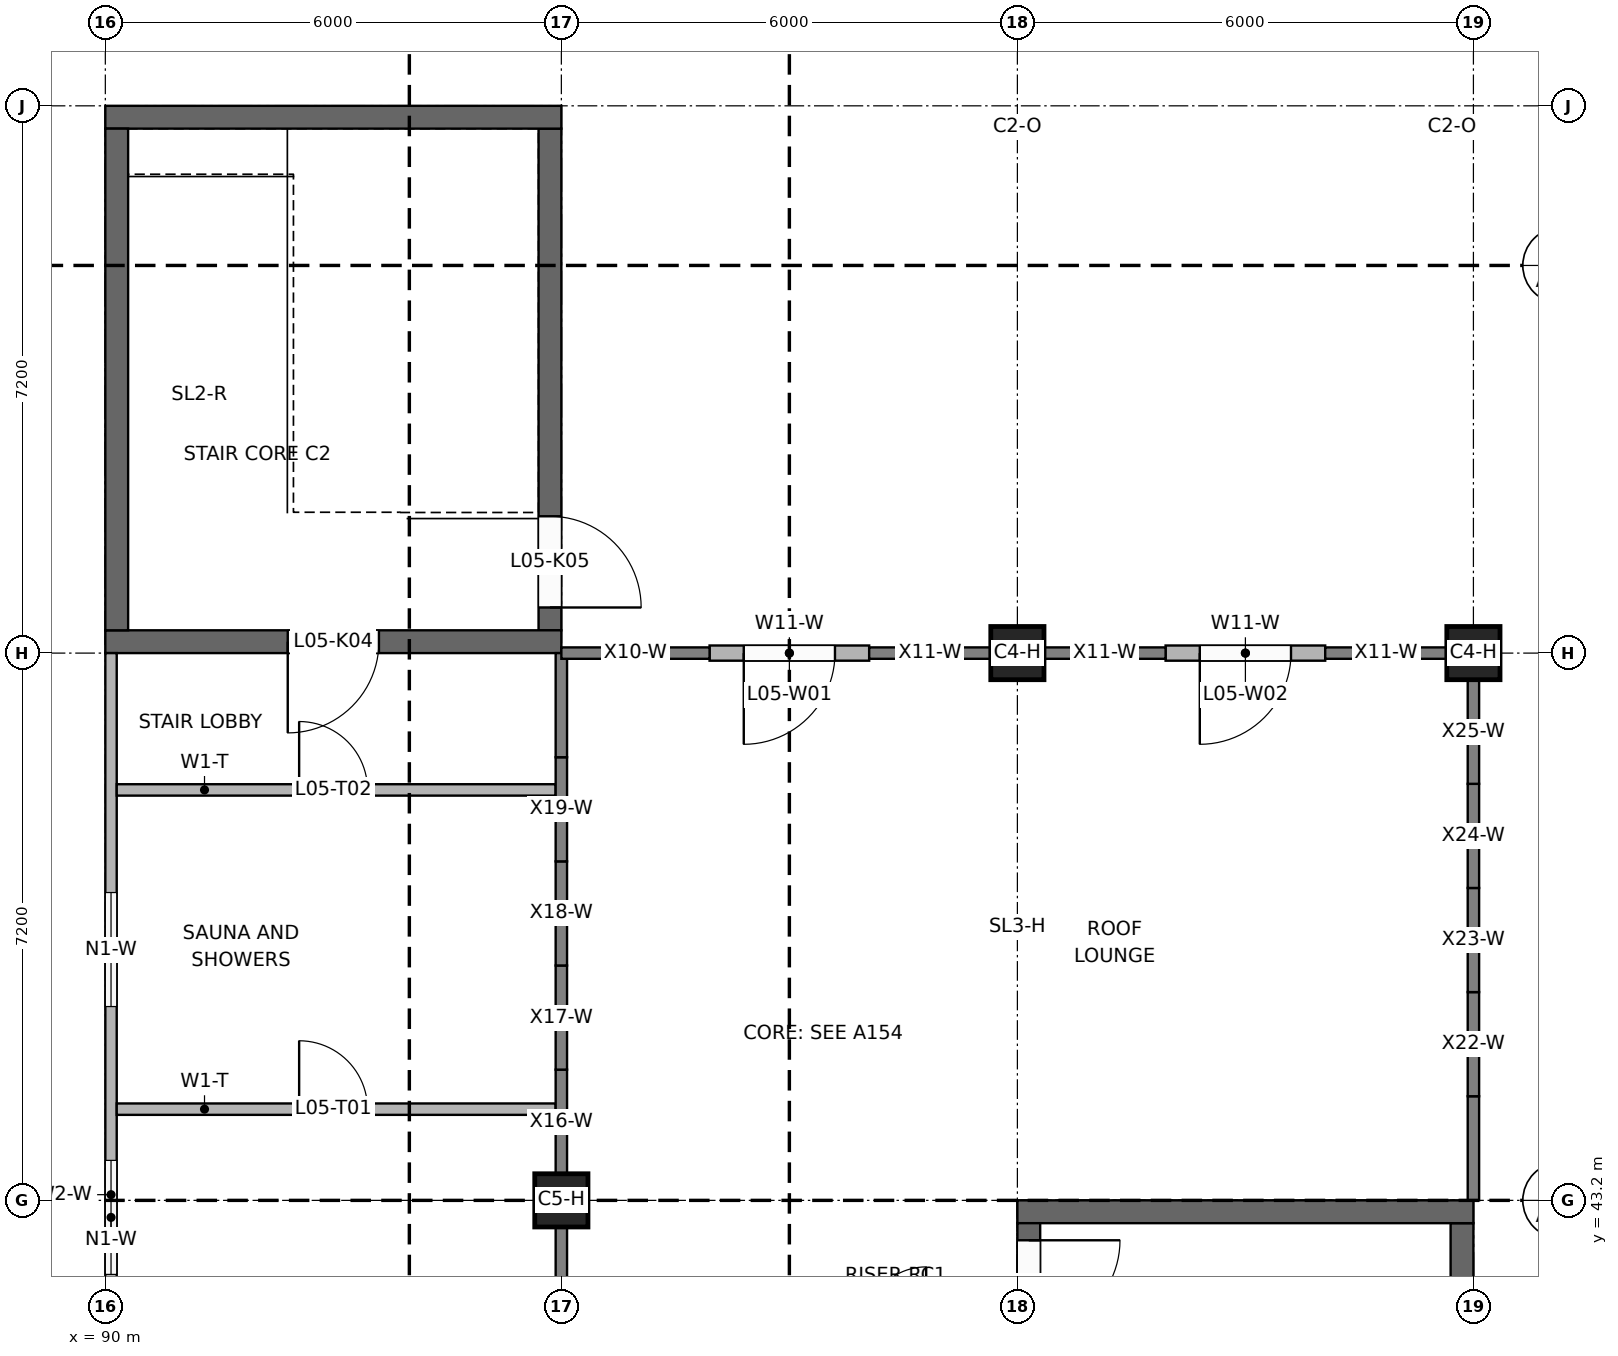
"""IFC4 building model, lengths in metres.
Left out: names, types, materials, properties, quantities, classifications, styles, units other than length and angle.
Written with IfcOpenShell. Run it as: python <this file> out.ifc"""

import sys

from ifc_helpers import new_model, si_unit, direction, frame, frame_2d, origin, origin_2d, place, context, subcontext, project, spatial, rectangle, hollow_rectangle, extrude, element, fill, save


model = new_model("IFC4")
c1 = context("Model", 3, precision=1e-05, world=origin(), true_north=direction((0.0, 1.0)))
c2 = subcontext(c1, "Body", "Model", "MODEL_VIEW")
j1 = project(units=[si_unit("LENGTHUNIT", "METRE"), si_unit("PLANEANGLEUNIT", "RADIAN")], contexts=[c1])
p1 = place(None, origin())
s1 = spatial("IfcSite", under=j1, at=p1, CompositionType="ELEMENT")
p2 = place(p1, origin())
s2 = spatial("IfcBuilding", under=s1, at=p2, CompositionType="ELEMENT")
p3 = place(p2, frame((0.0, 0.0, 21.0)))
s3 = spatial("IfcBuildingStorey", under=s2, at=p3, CompositionType="ELEMENT", Elevation=21.0)
p4 = place(p3, frame((102.0, 43.05, 0.0), z_axis=(0.0, 0.0, 1.0), x_axis=(1.0, 0.0, 0.0)))
e1 = element("IfcWall", 1, at=p4, inside=s3, PredefinedType="SHEAR", context=c2, shape_type="SweptSolid", body=[
    extrude(rectangle(XDim=6.0, YDim=0.3, at=frame_2d((3.0, 0.0))), origin(), (0.0, 0.0, 1.0), 2.75),
])
p5 = place(p3, frame((102.15, 36.3, 0.0), z_axis=(0.0, 0.0, 1.0), x_axis=(0.0, 1.0, 0.0)))
e2 = element("IfcWall", 2, at=p5, inside=s3, PredefinedType="SHEAR", context=c2, shape_type="SweptSolid", body=[
    extrude(rectangle(XDim=6.6, YDim=0.3, at=frame_2d((3.3, 0.0))), origin(), (0.0, 0.0, 1.0), 2.75),
])
p6 = place(p5, frame((5.175, 0.0, 0.0)))
e3 = element("IfcOpeningElement", 3, at=p6, cuts=e2, PredefinedType="OPENING", context=c2, shape_type="SweptSolid", body=[
    extrude(rectangle(XDim=1.2, YDim=2.1, at=frame_2d((0.6, 1.05))), frame((0.0, 0.16, 0.0), z_axis=(0.0, -1.0, 0.0), x_axis=(1.0, 0.0, 0.0)), (0.0, 0.0, 1.0), 0.32),
])
p7 = place(p3, frame((107.85, 36.3, 0.0), z_axis=(0.0, 0.0, 1.0), x_axis=(0.0, 1.0, 0.0)))
e4 = element("IfcWall", 4, at=p7, inside=s3, PredefinedType="SHEAR", context=c2, shape_type="SweptSolid", body=[
    extrude(rectangle(XDim=6.6, YDim=0.3, at=frame_2d((3.3, 0.0))), origin(), (0.0, 0.0, 1.0), 2.75),
])
p8 = place(p3, frame((90.0, 50.55, 0.0), z_axis=(0.0, 0.0, 1.0), x_axis=(1.0, 0.0, 0.0)))
e5 = element("IfcWall", 5, at=p8, inside=s3, PredefinedType="SHEAR", context=c2, shape_type="SweptSolid", body=[
    extrude(rectangle(XDim=6.0, YDim=0.3, at=frame_2d((3.0, 0.0))), origin(), (0.0, 0.0, 1.0), 2.4),
])
p9 = place(p8, frame((2.4, 0.0, 0.0)))
e6 = element("IfcOpeningElement", 6, at=p9, cuts=e5, PredefinedType="OPENING", context=c2, shape_type="SweptSolid", body=[
    extrude(rectangle(XDim=1.2, YDim=2.1, at=frame_2d((0.6, 1.05))), frame((0.0, 0.16, 0.0), z_axis=(0.0, -1.0, 0.0), x_axis=(1.0, 0.0, 0.0)), (0.0, 0.0, 1.0), 0.32),
])
p10 = place(p3, frame((90.0, 57.45, 0.0), z_axis=(0.0, 0.0, 1.0), x_axis=(1.0, 0.0, 0.0)))
e7 = element("IfcWall", 7, at=p10, inside=s3, PredefinedType="SHEAR", context=c2, shape_type="SweptSolid", body=[
    extrude(rectangle(XDim=6.0, YDim=0.3, at=frame_2d((3.0, 0.0))), origin(), (0.0, 0.0, 1.0), 2.4),
])
p11 = place(p3, frame((90.15, 50.7, 0.0), z_axis=(0.0, 0.0, 1.0), x_axis=(0.0, 1.0, 0.0)))
e8 = element("IfcWall", 8, at=p11, inside=s3, PredefinedType="SHEAR", context=c2, shape_type="SweptSolid", body=[
    extrude(rectangle(XDim=6.6, YDim=0.3, at=frame_2d((3.3, 0.0))), origin(), (0.0, 0.0, 1.0), 2.4),
])
p12 = place(p3, frame((95.85, 50.7, 0.0), z_axis=(0.0, 0.0, 1.0), x_axis=(0.0, 1.0, 0.0)))
e9 = element("IfcWall", 9, at=p12, inside=s3, PredefinedType="SHEAR", context=c2, shape_type="SweptSolid", body=[
    extrude(rectangle(XDim=6.6, YDim=0.3, at=frame_2d((3.3, 0.0))), origin(), (0.0, 0.0, 1.0), 2.4),
])
p13 = place(p12, frame((0.3, 0.0, 0.0)))
e10 = element("IfcOpeningElement", 10, at=p13, cuts=e9, PredefinedType="OPENING", context=c2, shape_type="SweptSolid", body=[
    extrude(rectangle(XDim=1.2, YDim=2.1, at=frame_2d((0.6, 1.05))), frame((0.0, 0.16, 0.0), z_axis=(0.0, -1.0, 0.0), x_axis=(1.0, 0.0, 0.0)), (0.0, 0.0, 1.0), 0.32),
])
p14 = place(p3, frame((96.0, 43.2, 0.0), z_axis=(0.0, 0.0, 1.0), x_axis=(1.0, 0.0, 0.0)))
e11 = element("IfcColumn", 11, at=p14, inside=s3, PredefinedType="COLUMN", context=c2, shape_type="SweptSolid", body=[
    extrude(rectangle(XDim=0.7, YDim=0.7, at=origin_2d()), origin(), (0.0, 0.0, 1.0), 2.247),
])
for number, where, z_axis, x_axis in (
    (12, (102.0, 50.4, 0.0), (0.0, 0.0, 1.0), (1.0, 0.0, 0.0)),
    (13, (108.0, 50.4, 0.0), (0.0, 0.0, 1.0), (1.0, 0.0, 0.0)),
):
    element("IfcColumn", number, at=place(p3, frame(where, z_axis=z_axis, x_axis=x_axis)), inside=s3, PredefinedType="COLUMN", context=c2, shape_type="SweptSolid", body=[
        extrude(rectangle(XDim=0.7, YDim=0.7, at=origin_2d()), origin(), (0.0, 0.0, 1.0), 3.714),
    ])
p15 = place(p3, frame((107.91, 50.42, 0.0), z_axis=(0.0, 0.0, 1.0), x_axis=(0.0, 1.0, 0.0)))
e14 = element("IfcWall", 14, at=p15, inside=s3, PredefinedType="PARAPET", context=c2, shape_type="SweptSolid", body=[
    extrude(rectangle(XDim=7.18, YDim=0.18, at=frame_2d((3.59, 0.0))), origin(), (0.0, 0.0, 1.0), 1.1),
])
p16 = place(p3, frame((96.0, 57.51, 0.0), z_axis=(0.0, 0.0, 1.0), x_axis=(1.0, 0.0, 0.0)))
e15 = element("IfcWall", 15, at=p16, inside=s3, PredefinedType="PARAPET", context=c2, shape_type="SweptSolid", body=[
    extrude(rectangle(XDim=12.0, YDim=0.18, at=frame_2d((6.0, 0.0))), origin(), (0.0, 0.0, 1.0), 1.1),
])
p17 = place(p3, frame((90.075, 36.0, 0.0), z_axis=(0.0, 0.0, 1.0), x_axis=(0.0, 1.0, 0.0)))
e16 = element("IfcWall", 16, at=p17, inside=s3, PredefinedType="PARAPET", context=c2, shape_type="SweptSolid", body=[
    extrude(rectangle(XDim=14.4, YDim=0.15, at=frame_2d((7.2, 0.0))), origin(), (0.0, 0.0, 1.0), 1.1),
])
for number, where, z_axis, x_axis in (
    (17, (102.0, 57.32, 0.0), (0.0, 0.0, 1.0), (1.0, 0.0, 0.0)),
    (18, (107.72, 57.32, 0.0), (0.0, 0.0, 1.0), (1.0, 0.0, 0.0)),
):
    element("IfcColumn", number, at=place(p3, frame(where, z_axis=z_axis, x_axis=x_axis)), inside=s3, PredefinedType="COLUMN", context=c2, shape_type="SweptSolid", body=[
        extrude(hollow_rectangle(XDim=0.12, YDim=0.12, WallThickness=0.006, at=origin_2d()), origin(), (0.0, 0.0, 1.0), 2.55),
    ])
p18 = place(p3, frame((90.075, 36.15, 1.1), z_axis=(0.0, 0.0, 1.0), x_axis=(0.0, 1.0, 0.0)))
e19 = element("IfcWall", 19, at=p18, inside=s3, PredefinedType="SOLIDWALL", context=c2, shape_type="SweptSolid", body=[
    extrude(rectangle(XDim=14.25, YDim=0.15, at=frame_2d((7.125, 0.0))), origin(), (0.0, 0.0, 1.0), 1.65),
])
p19 = place(p18, frame((0.394, 0.0, 0.3)))
e20 = element("IfcOpeningElement", 20, at=p19, cuts=e19, PredefinedType="OPENING", context=c2, shape_type="SweptSolid", body=[
    extrude(rectangle(XDim=1.5, YDim=1.0, at=frame_2d((0.75, 0.5))), frame((0.0, 0.085, 0.0), z_axis=(0.0, -1.0, 0.0), x_axis=(1.0, 0.0, 0.0)), (0.0, 0.0, 1.0), 0.17),
])
p20 = place(p18, frame((2.288, 0.0, 0.3)))
e21 = element("IfcOpeningElement", 21, at=p20, cuts=e19, PredefinedType="OPENING", context=c2, shape_type="SweptSolid", body=[
    extrude(rectangle(XDim=1.5, YDim=1.0, at=frame_2d((0.75, 0.5))), frame((0.0, 0.085, 0.0), z_axis=(0.0, -1.0, 0.0), x_axis=(1.0, 0.0, 0.0)), (0.0, 0.0, 1.0), 0.17),
])
p21 = place(p18, frame((4.182, 0.0, 0.3)))
e22 = element("IfcOpeningElement", 22, at=p21, cuts=e19, PredefinedType="OPENING", context=c2, shape_type="SweptSolid", body=[
    extrude(rectangle(XDim=1.5, YDim=1.0, at=frame_2d((0.75, 0.5))), frame((0.0, 0.085, 0.0), z_axis=(0.0, -1.0, 0.0), x_axis=(1.0, 0.0, 0.0)), (0.0, 0.0, 1.0), 0.17),
])
p22 = place(p18, frame((6.076, 0.0, 0.3)))
e23 = element("IfcOpeningElement", 23, at=p22, cuts=e19, PredefinedType="OPENING", context=c2, shape_type="SweptSolid", body=[
    extrude(rectangle(XDim=1.5, YDim=1.0, at=frame_2d((0.75, 0.5))), frame((0.0, 0.085, 0.0), z_axis=(0.0, -1.0, 0.0), x_axis=(1.0, 0.0, 0.0)), (0.0, 0.0, 1.0), 0.17),
])
p23 = place(p18, frame((9.6, 0.0, 0.3)))
e24 = element("IfcOpeningElement", 24, at=p23, cuts=e19, PredefinedType="OPENING", context=c2, shape_type="SweptSolid", body=[
    extrude(rectangle(XDim=1.5, YDim=1.0, at=frame_2d((0.75, 0.5))), frame((0.0, 0.085, 0.0), z_axis=(0.0, -1.0, 0.0), x_axis=(1.0, 0.0, 0.0)), (0.0, 0.0, 1.0), 0.17),
])
p24 = place(p3, frame((97.95, 50.4, 0.0), z_axis=(0.0, 0.0, 1.0), x_axis=(1.0, 0.0, 0.0)))
e25 = element("IfcWall", 25, at=p24, inside=s3, PredefinedType="SOLIDWALL", context=c2, shape_type="SweptSolid", body=[
    extrude(rectangle(XDim=2.1, YDim=0.2, at=frame_2d((1.05, 0.0))), origin(), (0.0, 0.0, 1.0), 3.714),
])
p25 = place(p24, frame((0.45, 0.0, 0.0)))
e26 = element("IfcOpeningElement", 26, at=p25, cuts=e25, PredefinedType="OPENING", context=c2, shape_type="SweptSolid", body=[
    extrude(rectangle(XDim=1.2, YDim=2.4, at=frame_2d((0.6, 1.2))), frame((0.0, 0.11, 0.0), z_axis=(0.0, -1.0, 0.0), x_axis=(1.0, 0.0, 0.0)), (0.0, 0.0, 1.0), 0.22),
])
p26 = place(p3, frame((103.95, 50.4, 0.0), z_axis=(0.0, 0.0, 1.0), x_axis=(1.0, 0.0, 0.0)))
e27 = element("IfcWall", 27, at=p26, inside=s3, PredefinedType="SOLIDWALL", context=c2, shape_type="SweptSolid", body=[
    extrude(rectangle(XDim=2.1, YDim=0.2, at=frame_2d((1.05, 0.0))), origin(), (0.0, 0.0, 1.0), 3.714),
])
p27 = place(p26, frame((0.45, 0.0, 0.0)))
e28 = element("IfcOpeningElement", 28, at=p27, cuts=e27, PredefinedType="OPENING", context=c2, shape_type="SweptSolid", body=[
    extrude(rectangle(XDim=1.2, YDim=2.4, at=frame_2d((0.6, 1.2))), frame((0.0, 0.11, 0.0), z_axis=(0.0, -1.0, 0.0), x_axis=(1.0, 0.0, 0.0)), (0.0, 0.0, 1.0), 0.22),
])
p28 = place(p3, frame((90.15, 44.4, 0.0), z_axis=(0.0, 0.0, 1.0), x_axis=(1.0, 0.0, 0.0)))
e29 = element("IfcWall", 29, at=p28, inside=s3, PredefinedType="PARTITIONING", context=c2, shape_type="SweptSolid", body=[
    extrude(rectangle(XDim=5.775, YDim=0.15, at=frame_2d((2.888, 0.0))), origin(), (0.0, 0.0, 1.0), 2.75),
])
p29 = place(p28, frame((2.4, 0.0, 0.0)))
e30 = element("IfcOpeningElement", 30, at=p29, cuts=e29, PredefinedType="OPENING", context=c2, shape_type="SweptSolid", body=[
    extrude(rectangle(XDim=0.9, YDim=2.1, at=frame_2d((0.45, 1.05))), frame((0.0, 0.085, 0.0), z_axis=(0.0, -1.0, 0.0), x_axis=(1.0, 0.0, 0.0)), (0.0, 0.0, 1.0), 0.17),
])
p30 = place(p3, frame((90.15, 48.6, 0.0), z_axis=(0.0, 0.0, 1.0), x_axis=(1.0, 0.0, 0.0)))
e31 = element("IfcWall", 31, at=p30, inside=s3, PredefinedType="PARTITIONING", context=c2, shape_type="SweptSolid", body=[
    extrude(rectangle(XDim=5.775, YDim=0.15, at=frame_2d((2.888, 0.0))), origin(), (0.0, 0.0, 1.0), 2.75),
])
p31 = place(p30, frame((2.4, 0.0, 0.0)))
e32 = element("IfcOpeningElement", 32, at=p31, cuts=e31, PredefinedType="OPENING", context=c2, shape_type="SweptSolid", body=[
    extrude(rectangle(XDim=0.9, YDim=2.1, at=frame_2d((0.45, 1.05))), frame((0.0, 0.085, 0.0), z_axis=(0.0, -1.0, 0.0), x_axis=(1.0, 0.0, 0.0)), (0.0, 0.0, 1.0), 0.17),
])
p32 = place(p22, origin())
e33 = element("IfcWindow", 33, at=p32, inside=s3, PartitioningType="SINGLE_PANEL", PredefinedType="WINDOW", context=c2, shape_type="SweptSolid", body=[
    extrude(rectangle(XDim=1.5, YDim=1.0, at=frame_2d((0.75, 0.5))), frame((0.0, 0.03, 0.0), z_axis=(0.0, -1.0, 0.0), x_axis=(1.0, 0.0, 0.0)), (0.0, 0.0, 1.0), 0.06),
])
fill(e23, e33)
p33 = place(p23, origin())
e34 = element("IfcWindow", 34, at=p33, inside=s3, PartitioningType="SINGLE_PANEL", PredefinedType="WINDOW", context=c2, shape_type="SweptSolid", body=[
    extrude(rectangle(XDim=1.5, YDim=1.0, at=frame_2d((0.75, 0.5))), frame((0.0, 0.03, 0.0), z_axis=(0.0, -1.0, 0.0), x_axis=(1.0, 0.0, 0.0)), (0.0, 0.0, 1.0), 0.06),
])
fill(e24, e34)
p34 = place(p25, frame((1.2, 0.0, 0.0), z_axis=(0.0, 0.0, 1.0), x_axis=(-1.0, 0.0, 0.0)))
e35 = element("IfcDoor", 35, at=p34, inside=s3, OperationType="SINGLE_SWING_RIGHT", PredefinedType="DOOR", context=c2, shape_type="SweptSolid", body=[
    extrude(rectangle(XDim=1.2, YDim=2.4, at=frame_2d((0.6, 1.2))), frame((0.0, 0.025, 0.0), z_axis=(0.0, -1.0, 0.0), x_axis=(1.0, 0.0, 0.0)), (0.0, 0.0, 1.0), 0.05),
])
fill(e26, e35)
p35 = place(p27, frame((1.2, 0.0, 0.0), z_axis=(0.0, 0.0, 1.0), x_axis=(-1.0, 0.0, 0.0)))
e36 = element("IfcDoor", 36, at=p35, inside=s3, OperationType="SINGLE_SWING_RIGHT", PredefinedType="DOOR", context=c2, shape_type="SweptSolid", body=[
    extrude(rectangle(XDim=1.2, YDim=2.4, at=frame_2d((0.6, 1.2))), frame((0.0, 0.025, 0.0), z_axis=(0.0, -1.0, 0.0), x_axis=(1.0, 0.0, 0.0)), (0.0, 0.0, 1.0), 0.05),
])
fill(e28, e36)
p36 = place(p6, frame((1.2, 0.0, 0.0), z_axis=(0.0, 0.0, 1.0), x_axis=(-1.0, 0.0, 0.0)))
e37 = element("IfcDoor", 37, at=p36, inside=s3, OperationType="SINGLE_SWING_LEFT", PredefinedType="DOOR", context=c2, shape_type="SweptSolid", body=[
    extrude(rectangle(XDim=1.2, YDim=2.1, at=frame_2d((0.6, 1.05))), frame((0.0, 0.025, 0.0), z_axis=(0.0, -1.0, 0.0), x_axis=(1.0, 0.0, 0.0)), (0.0, 0.0, 1.0), 0.05),
])
fill(e3, e37)
p37 = place(p9, frame((1.2, 0.0, 0.0), z_axis=(0.0, 0.0, 1.0), x_axis=(-1.0, 0.0, 0.0)))
e38 = element("IfcDoor", 38, at=p37, inside=s3, OperationType="SINGLE_SWING_RIGHT", PredefinedType="DOOR", context=c2, shape_type="SweptSolid", body=[
    extrude(rectangle(XDim=1.2, YDim=2.1, at=frame_2d((0.6, 1.05))), frame((0.0, 0.025, 0.0), z_axis=(0.0, -1.0, 0.0), x_axis=(1.0, 0.0, 0.0)), (0.0, 0.0, 1.0), 0.05),
])
fill(e6, e38)
p38 = place(p13, frame((1.2, 0.0, 0.0), z_axis=(0.0, 0.0, 1.0), x_axis=(-1.0, 0.0, 0.0)))
e39 = element("IfcDoor", 39, at=p38, inside=s3, OperationType="SINGLE_SWING_RIGHT", PredefinedType="DOOR", context=c2, shape_type="SweptSolid", body=[
    extrude(rectangle(XDim=1.2, YDim=2.1, at=frame_2d((0.6, 1.05))), frame((0.0, 0.025, 0.0), z_axis=(0.0, -1.0, 0.0), x_axis=(1.0, 0.0, 0.0)), (0.0, 0.0, 1.0), 0.05),
])
fill(e10, e39)
p39 = place(p29, origin())
e40 = element("IfcDoor", 40, at=p39, inside=s3, OperationType="SINGLE_SWING_LEFT", PredefinedType="DOOR", context=c2, shape_type="SweptSolid", body=[
    extrude(rectangle(XDim=0.9, YDim=2.1, at=frame_2d((0.45, 1.05))), frame((0.0, 0.025, 0.0), z_axis=(0.0, -1.0, 0.0), x_axis=(1.0, 0.0, 0.0)), (0.0, 0.0, 1.0), 0.05),
])
fill(e30, e40)
p40 = place(p31, origin())
e41 = element("IfcDoor", 41, at=p40, inside=s3, OperationType="SINGLE_SWING_LEFT", PredefinedType="DOOR", context=c2, shape_type="SweptSolid", body=[
    extrude(rectangle(XDim=0.9, YDim=2.1, at=frame_2d((0.45, 1.05))), frame((0.0, 0.025, 0.0), z_axis=(0.0, -1.0, 0.0), x_axis=(1.0, 0.0, 0.0)), (0.0, 0.0, 1.0), 0.05),
])
fill(e32, e41)
save(model, sys.argv[1])
